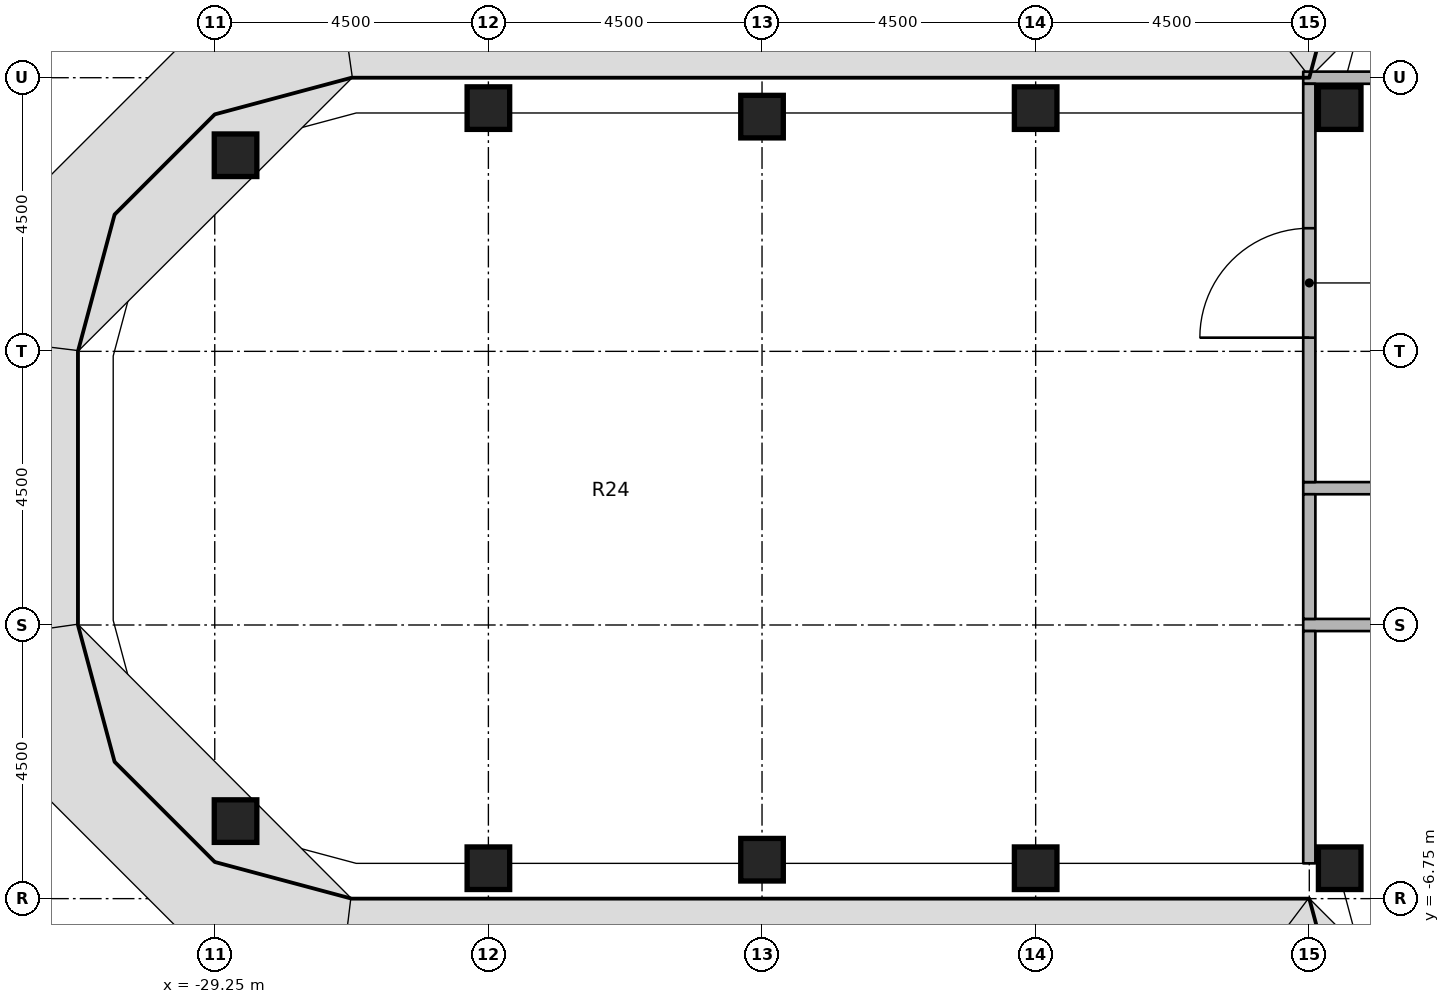
"""IFC4 building model, lengths in metres.
Left out: names, types, materials, properties, quantities, classifications, styles, units other than length and angle.
Written with IfcOpenShell. Run it as: python <this file> out.ifc"""

import sys

from ifc_helpers import new_model, si_unit, direction, frame, frame_2d, origin, origin_2d, place, context, subcontext, project, spatial, rectangle, extrude, element, fill, save


model = new_model("IFC4")
c1 = context("Model", 3, precision=1e-05, world=origin(), true_north=direction((0.0, 1.0)))
c2 = subcontext(c1, "Body", "Model", "MODEL_VIEW")
j1 = project(units=[si_unit("LENGTHUNIT", "METRE"), si_unit("PLANEANGLEUNIT", "RADIAN")], contexts=[c1])
p1 = place(None, origin())
s1 = spatial("IfcSite", under=j1, at=p1, CompositionType="ELEMENT")
p2 = place(p1, origin())
s2 = spatial("IfcBuilding", under=s1, at=p2, CompositionType="ELEMENT")
p3 = place(p2, frame((0.0, 0.0, 218.2)))
s3 = spatial("IfcBuildingStorey", under=s2, at=p3, CompositionType="ELEMENT", Elevation=218.2)
for number, where, z_axis, x_axis in (
    (1, (-28.908, -5.475, 0.0), (0.0, 0.0, 1.0), (1.0, 0.0, 0.0)),
    (2, (-28.908, 5.475, 0.0), (0.0, 0.0, 1.0), (1.0, 0.0, 0.0)),
    (3, (-24.75, -6.25, 0.0), (0.0, 0.0, 1.0), (1.0, 0.0, 0.0)),
    (4, (-24.75, 6.25, 0.0), (0.0, 0.0, 1.0), (1.0, 0.0, 0.0)),
    (5, (-20.25, -6.11, 0.0), (0.0, 0.0, 1.0), (1.0, 0.0, 0.0)),
    (6, (-20.25, 6.11, 0.0), (0.0, 0.0, 1.0), (1.0, 0.0, 0.0)),
    (7, (-15.75, -6.25, 0.0), (0.0, 0.0, 1.0), (1.0, 0.0, 0.0)),
    (8, (-15.75, 6.25, 0.0), (0.0, 0.0, 1.0), (1.0, 0.0, 0.0)),
    (9, (-10.75, -6.25, 0.0), (0.0, 0.0, 1.0), (1.0, 0.0, 0.0)),
    (10, (-10.75, 6.25, 0.0), (0.0, 0.0, 1.0), (1.0, 0.0, 0.0)),
):
    element("IfcColumn", number, at=place(p3, frame(where, z_axis=z_axis, x_axis=x_axis)), inside=s3, PredefinedType="COLUMN", context=c2, shape_type="SweptSolid", body=[
        extrude(rectangle(XDim=0.7, YDim=0.7, at=origin_2d()), origin(), (0.0, 0.0, 1.0), 3.65),
    ])
p4 = place(p3, frame((-11.35, 0.0, 0.0), z_axis=(0.0, 0.0, 1.0), x_axis=(1.0, 0.0, 0.0)))
e11 = element("IfcWall", 11, at=p4, inside=s3, PredefinedType="PARTITIONING", context=c2, shape_type="SweptSolid", body=[
    extrude(rectangle(XDim=4.7, YDim=0.2, at=frame_2d((2.35, 0.0))), origin(), (0.0, 0.0, 1.0), 2.75),
])
p5 = place(p4, frame((1.85, 0.0, 0.0)))
e12 = element("IfcOpeningElement", 12, at=p5, cuts=e11, PredefinedType="OPENING", context=c2, shape_type="SweptSolid", body=[
    extrude(rectangle(XDim=1.0, YDim=2.1, at=frame_2d((0.5, 1.05))), frame((0.0, 0.11, 0.0), z_axis=(0.0, -1.0, 0.0), x_axis=(1.0, 0.0, 0.0)), (0.0, 0.0, 1.0), 0.22),
])
p6 = place(p3, frame((-6.65, -2.25, 0.0), z_axis=(0.0, 0.0, 1.0), x_axis=(-1.0, 0.0, 0.0)))
e13 = element("IfcWall", 13, at=p6, inside=s3, PredefinedType="PARTITIONING", context=c2, shape_type="SweptSolid", body=[
    extrude(rectangle(XDim=4.7, YDim=0.2, at=frame_2d((2.35, 0.0))), origin(), (0.0, 0.0, 1.0), 2.75),
])
p7 = place(p6, frame((1.85, 0.0, 0.0)))
e14 = element("IfcOpeningElement", 14, at=p7, cuts=e13, PredefinedType="OPENING", context=c2, shape_type="SweptSolid", body=[
    extrude(rectangle(XDim=1.0, YDim=2.1, at=frame_2d((0.5, 1.05))), frame((0.0, 0.11, 0.0), z_axis=(0.0, -1.0, 0.0), x_axis=(1.0, 0.0, 0.0)), (0.0, 0.0, 1.0), 0.22),
])
p8 = place(p3, frame((-11.25, -2.15, 0.0), z_axis=(0.0, 0.0, 1.0), x_axis=(0.0, 1.0, 0.0)))
e15 = element("IfcWall", 15, at=p8, inside=s3, PredefinedType="PARTITIONING", context=c2, shape_type="SweptSolid", body=[
    extrude(rectangle(XDim=2.05, YDim=0.2, at=frame_2d((1.025, 0.0))), origin(), (0.0, 0.0, 1.0), 2.75),
])
p9 = place(p3, frame((-11.35, 6.75, 0.0), z_axis=(0.0, 0.0, 1.0), x_axis=(1.0, 0.0, 0.0)))
e16 = element("IfcWall", 16, at=p9, inside=s3, PredefinedType="PARTITIONING", context=c2, shape_type="SweptSolid", body=[
    extrude(rectangle(XDim=4.7, YDim=0.2, at=frame_2d((2.35, 0.0))), origin(), (0.0, 0.0, 1.0), 2.75),
])
p10 = place(p3, frame((-11.25, 0.1, 0.0), z_axis=(0.0, 0.0, 1.0), x_axis=(0.0, 1.0, 0.0)))
e17 = element("IfcWall", 17, at=p10, inside=s3, PredefinedType="PARTITIONING", context=c2, shape_type="SweptSolid", body=[
    extrude(rectangle(XDim=6.55, YDim=0.2, at=frame_2d((3.275, 0.0))), origin(), (0.0, 0.0, 1.0), 2.75),
])
p11 = place(p10, frame((2.375, 0.0, 0.0)))
e18 = element("IfcOpeningElement", 18, at=p11, cuts=e17, PredefinedType="OPENING", context=c2, shape_type="SweptSolid", body=[
    extrude(rectangle(XDim=1.8, YDim=2.1, at=frame_2d((0.9, 1.05))), frame((0.0, 0.11, 0.0), z_axis=(0.0, -1.0, 0.0), x_axis=(1.0, 0.0, 0.0)), (0.0, 0.0, 1.0), 0.22),
])
p12 = place(p3, frame((-11.25, -6.17, 0.0), z_axis=(0.0, 0.0, 1.0), x_axis=(0.0, 1.0, 0.0)))
e19 = element("IfcWall", 19, at=p12, inside=s3, PredefinedType="PARTITIONING", context=c2, shape_type="SweptSolid", body=[
    extrude(rectangle(XDim=3.82, YDim=0.2, at=frame_2d((1.91, 0.0))), origin(), (0.0, 0.0, 1.0), 2.75),
])
p13 = place(p11, origin())
e20 = element("IfcDoor", 20, at=p13, inside=s3, OperationType="DOUBLE_DOOR_SINGLE_SWING", PredefinedType="DOOR", context=c2, shape_type="SweptSolid", body=[
    extrude(rectangle(XDim=1.8, YDim=2.1, at=frame_2d((0.9, 1.05))), frame((0.0, 0.025, 0.0), z_axis=(0.0, -1.0, 0.0), x_axis=(1.0, 0.0, 0.0)), (0.0, 0.0, 1.0), 0.05),
])
fill(e18, e20)
save(model, sys.argv[1])
